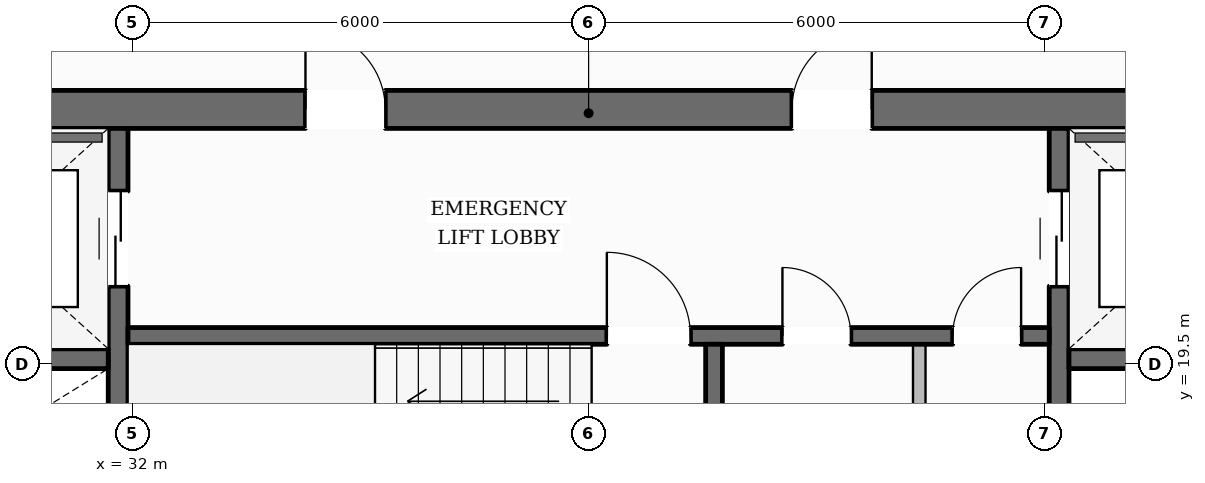
"""IFC4 building model, lengths in metres.
Left out: names, types, materials, properties, quantities, classifications, styles, units other than length and angle.
Written with IfcOpenShell. Run it as: python <this file> out.ifc"""

import sys

from ifc_helpers import new_model, si_unit, direction, frame, frame_2d, origin, place, context, subcontext, project, spatial, rectangle, extrude, element, fill, save


model = new_model("IFC4")
c1 = context("Model", 3, precision=1e-05, world=origin(), true_north=direction((0.0, 1.0)))
c2 = subcontext(c1, "Body", "Model", "MODEL_VIEW")
j1 = project(units=[si_unit("LENGTHUNIT", "METRE"), si_unit("PLANEANGLEUNIT", "RADIAN")], contexts=[c1])
p1 = place(None, origin())
s1 = spatial("IfcSite", under=j1, at=p1, CompositionType="ELEMENT")
p2 = place(p1, origin())
s2 = spatial("IfcBuilding", under=s1, at=p2, CompositionType="ELEMENT")
p3 = place(p2, frame((0.0, 0.0, 97.05)))
s3 = spatial("IfcBuildingStorey", under=s2, at=p3, CompositionType="ELEMENT", Elevation=97.05)
p4 = place(p3, frame((27.98, 22.85, 0.0), z_axis=(0.0, 0.0, 1.0), x_axis=(1.0, 0.0, 0.0)))
e1 = element("IfcWall", 1, at=p4, inside=s3, PredefinedType="SOLIDWALL", context=c2, shape_type="SweptSolid", body=[
    extrude(rectangle(XDim=20.04, YDim=0.5, at=frame_2d((10.02, 0.0))), origin(), (0.0, 0.0, 1.0), 3.6),
])
p5 = place(p4, frame((6.295, 0.0, 0.0)))
e2 = element("IfcOpeningElement", 2, at=p5, cuts=e1, PredefinedType="OPENING", context=c2, shape_type="SweptSolid", body=[
    extrude(rectangle(XDim=1.05, YDim=2.15, at=frame_2d((0.525, 1.075))), frame((0.0, 0.26, 0.0), z_axis=(0.0, -1.0, 0.0), x_axis=(1.0, 0.0, 0.0)), (0.0, 0.0, 1.0), 0.52),
])
p6 = place(p4, frame((12.695, 0.0, 0.0)))
e3 = element("IfcOpeningElement", 3, at=p6, cuts=e1, PredefinedType="OPENING", context=c2, shape_type="SweptSolid", body=[
    extrude(rectangle(XDim=1.05, YDim=2.15, at=frame_2d((0.525, 1.075))), frame((0.0, 0.26, 0.0), z_axis=(0.0, -1.0, 0.0), x_axis=(1.0, 0.0, 0.0)), (0.0, 0.0, 1.0), 0.52),
])
p7 = place(p3, frame((31.81, 9.6, 0.0), z_axis=(0.0, 0.0, 1.0), x_axis=(0.0, 1.0, 0.0)))
e4 = element("IfcWall", 4, at=p7, inside=s3, PredefinedType="SHEAR", context=c2, shape_type="SweptSolid", body=[
    extrude(rectangle(XDim=13.0, YDim=0.26, at=frame_2d((6.5, 0.0))), origin(), (0.0, 0.0, 1.0), 3.6),
])
p8 = place(p7, frame((10.925, 0.0, 0.0)))
e5 = element("IfcOpeningElement", 5, at=p8, cuts=e4, PredefinedType="OPENING", context=c2, shape_type="SweptSolid", body=[
    extrude(rectangle(XDim=1.25, YDim=2.25, at=frame_2d((0.625, 1.125))), frame((0.0, 0.14, 0.0), z_axis=(0.0, -1.0, 0.0), x_axis=(1.0, 0.0, 0.0)), (0.0, 0.0, 1.0), 0.28),
])
p9 = place(p3, frame((44.19, 9.6, 0.0), z_axis=(0.0, 0.0, 1.0), x_axis=(0.0, 1.0, 0.0)))
e6 = element("IfcWall", 6, at=p9, inside=s3, PredefinedType="SHEAR", context=c2, shape_type="SweptSolid", body=[
    extrude(rectangle(XDim=13.0, YDim=0.26, at=frame_2d((6.5, 0.0))), origin(), (0.0, 0.0, 1.0), 3.6),
])
p10 = place(p9, frame((10.925, 0.0, 0.0)))
e7 = element("IfcOpeningElement", 7, at=p10, cuts=e6, PredefinedType="OPENING", context=c2, shape_type="SweptSolid", body=[
    extrude(rectangle(XDim=1.25, YDim=2.25, at=frame_2d((0.625, 1.125))), frame((0.0, 0.14, 0.0), z_axis=(0.0, -1.0, 0.0), x_axis=(1.0, 0.0, 0.0)), (0.0, 0.0, 1.0), 0.28),
])
for number, where, z_axis, x_axis in (
    (8, (28.48, 19.57, 0.0), (0.0, 0.0, 1.0), (1.0, 0.0, 0.0)),
    (9, (44.32, 19.57, 0.0), (0.0, 0.0, 1.0), (1.0, 0.0, 0.0)),
):
    element("IfcWall", number, at=place(p3, frame(where, z_axis=z_axis, x_axis=x_axis)), inside=s3, PredefinedType="SHEAR", context=c2, shape_type="SweptSolid", body=[
        extrude(rectangle(XDim=3.2, YDim=0.26, at=frame_2d((1.6, 0.0))), origin(), (0.0, 0.0, 1.0), 3.6),
    ])
p11 = place(p3, frame((31.94, 19.87, 0.0), z_axis=(0.0, 0.0, 1.0), x_axis=(1.0, 0.0, 0.0)))
e10 = element("IfcWall", 10, at=p11, inside=s3, PredefinedType="SOLIDWALL", context=c2, shape_type="SweptSolid", body=[
    extrude(rectangle(XDim=12.12, YDim=0.22, at=frame_2d((6.06, 0.0))), origin(), (0.0, 0.0, 1.0), 3.6),
])
p12 = place(p11, frame((6.3, 0.0, 0.0)))
e11 = element("IfcOpeningElement", 11, at=p12, cuts=e10, PredefinedType="OPENING", context=c2, shape_type="SweptSolid", body=[
    extrude(rectangle(XDim=1.1, YDim=2.15, at=frame_2d((0.55, 1.075))), frame((0.0, 0.12, 0.0), z_axis=(0.0, -1.0, 0.0), x_axis=(1.0, 0.0, 0.0)), (0.0, 0.0, 1.0), 0.24),
])
p13 = place(p11, frame((8.61, 0.0, 0.0)))
e12 = element("IfcOpeningElement", 12, at=p13, cuts=e10, PredefinedType="OPENING", context=c2, shape_type="SweptSolid", body=[
    extrude(rectangle(XDim=0.9, YDim=2.1, at=frame_2d((0.45, 1.05))), frame((0.0, 0.12, 0.0), z_axis=(0.0, -1.0, 0.0), x_axis=(1.0, 0.0, 0.0)), (0.0, 0.0, 1.0), 0.24),
])
p14 = place(p11, frame((10.85, 0.0, 0.0)))
e13 = element("IfcOpeningElement", 13, at=p14, cuts=e10, PredefinedType="OPENING", context=c2, shape_type="SweptSolid", body=[
    extrude(rectangle(XDim=0.9, YDim=2.1, at=frame_2d((0.45, 1.05))), frame((0.0, 0.12, 0.0), z_axis=(0.0, -1.0, 0.0), x_axis=(1.0, 0.0, 0.0)), (0.0, 0.0, 1.0), 0.24),
])
p15 = place(p3, frame((39.65, 16.56, 0.0), z_axis=(0.0, 0.0, 1.0), x_axis=(0.0, 1.0, 0.0)))
e14 = element("IfcWall", 14, at=p15, inside=s3, PredefinedType="SOLIDWALL", context=c2, shape_type="SweptSolid", body=[
    extrude(rectangle(XDim=3.2, YDim=0.22, at=frame_2d((1.6, 0.0))), origin(), (0.0, 0.0, 1.0), 3.6),
])
p16 = place(p3, frame((14.113, 13.436, 0.0), z_axis=(0.0, 0.0, 1.0), x_axis=(0.493785476093, 0.869583753068, 0.0)))
e15 = element("IfcWall", 15, at=p16, inside=s3, PredefinedType="STANDARD", context=c2, shape_type="SweptSolid", body=[
    extrude(rectangle(XDim=36.023, YDim=0.38, at=frame_2d((18.011, 0.0))), origin(), (0.0, 0.0, 1.0), 3.059),
])
p17 = place(p16, frame((26.417, 0.0, 0.0)))
e16 = element("IfcOpeningElement", 16, at=p17, cuts=e15, PredefinedType="OPENING", context=c2, shape_type="SweptSolid", body=[
    extrude(rectangle(XDim=1.0, YDim=2.2, at=frame_2d((0.5, 1.1))), frame((0.0, 0.2, 0.0), z_axis=(0.0, -1.0, 0.0), x_axis=(1.0, 0.0, 0.0)), (0.0, 0.0, 1.0), 0.4),
])
p18 = place(p16, frame((31.845, 0.0, 0.65)))
e17 = element("IfcOpeningElement", 17, at=p18, cuts=e15, PredefinedType="OPENING", context=c2, shape_type="SweptSolid", body=[
    extrude(rectangle(XDim=1.55, YDim=1.75, at=frame_2d((0.775, 0.875))), frame((0.0, 0.2, 0.0), z_axis=(0.0, -1.0, 0.0), x_axis=(1.0, 0.0, 0.0)), (0.0, 0.0, 1.0), 0.4),
])
p19 = place(p16, frame((20.156, 0.0, 0.65)))
e18 = element("IfcOpeningElement", 18, at=p19, cuts=e15, PredefinedType="OPENING", context=c2, shape_type="SweptSolid", body=[
    extrude(rectangle(XDim=1.55, YDim=1.75, at=frame_2d((0.775, 0.875))), frame((0.0, 0.2, 0.0), z_axis=(0.0, -1.0, 0.0), x_axis=(1.0, 0.0, 0.0)), (0.0, 0.0, 1.0), 0.4),
])
p20 = place(p16, frame((8.466, 0.0, 0.65)))
e19 = element("IfcOpeningElement", 19, at=p20, cuts=e15, PredefinedType="OPENING", context=c2, shape_type="SweptSolid", body=[
    extrude(rectangle(XDim=1.55, YDim=1.75, at=frame_2d((0.775, 0.875))), frame((0.0, 0.2, 0.0), z_axis=(0.0, -1.0, 0.0), x_axis=(1.0, 0.0, 0.0)), (0.0, 0.0, 1.0), 0.4),
])
p21 = place(p16, frame((2.621, 0.0, 0.65)))
e20 = element("IfcOpeningElement", 20, at=p21, cuts=e15, PredefinedType="OPENING", context=c2, shape_type="SweptSolid", body=[
    extrude(rectangle(XDim=1.55, YDim=1.75, at=frame_2d((0.775, 0.875))), frame((0.0, 0.2, 0.0), z_axis=(0.0, -1.0, 0.0), x_axis=(1.0, 0.0, 0.0)), (0.0, 0.0, 1.0), 0.4),
])
p22 = place(p3, frame((44.161, 44.724, 0.0), z_axis=(0.0, 0.0, 1.0), x_axis=(0.496205042728, -0.86820536486, 0.0)))
e21 = element("IfcWall", 21, at=p22, inside=s3, PredefinedType="STANDARD", context=c2, shape_type="SweptSolid", body=[
    extrude(rectangle(XDim=36.193, YDim=0.38, at=frame_2d((18.097, 0.0))), origin(), (0.0, 0.0, 1.0), 3.059),
])
p23 = place(p22, frame((32.008, 0.0, 0.65)))
e22 = element("IfcOpeningElement", 22, at=p23, cuts=e21, PredefinedType="OPENING", context=c2, shape_type="SweptSolid", body=[
    extrude(rectangle(XDim=1.55, YDim=1.75, at=frame_2d((0.775, 0.875))), frame((0.0, 0.2, 0.0), z_axis=(0.0, -1.0, 0.0), x_axis=(1.0, 0.0, 0.0)), (0.0, 0.0, 1.0), 0.4),
])
p24 = place(p22, frame((26.134, 0.0, 0.65)))
e23 = element("IfcOpeningElement", 23, at=p24, cuts=e21, PredefinedType="OPENING", context=c2, shape_type="SweptSolid", body=[
    extrude(rectangle(XDim=1.55, YDim=1.75, at=frame_2d((0.775, 0.875))), frame((0.0, 0.2, 0.0), z_axis=(0.0, -1.0, 0.0), x_axis=(1.0, 0.0, 0.0)), (0.0, 0.0, 1.0), 0.4),
])
p25 = place(p22, frame((20.26, 0.0, 0.65)))
e24 = element("IfcOpeningElement", 24, at=p25, cuts=e21, PredefinedType="OPENING", context=c2, shape_type="SweptSolid", body=[
    extrude(rectangle(XDim=1.55, YDim=1.75, at=frame_2d((0.775, 0.875))), frame((0.0, 0.2, 0.0), z_axis=(0.0, -1.0, 0.0), x_axis=(1.0, 0.0, 0.0)), (0.0, 0.0, 1.0), 0.4),
])
p26 = place(p22, frame((8.513, 0.0, 0.65)))
e25 = element("IfcOpeningElement", 25, at=p26, cuts=e21, PredefinedType="OPENING", context=c2, shape_type="SweptSolid", body=[
    extrude(rectangle(XDim=1.55, YDim=1.75, at=frame_2d((0.775, 0.875))), frame((0.0, 0.2, 0.0), z_axis=(0.0, -1.0, 0.0), x_axis=(1.0, 0.0, 0.0)), (0.0, 0.0, 1.0), 0.4),
])
p27 = place(p22, frame((2.639, 0.0, 0.65)))
e26 = element("IfcOpeningElement", 26, at=p27, cuts=e21, PredefinedType="OPENING", context=c2, shape_type="SweptSolid", body=[
    extrude(rectangle(XDim=1.55, YDim=1.75, at=frame_2d((0.775, 0.875))), frame((0.0, 0.2, 0.0), z_axis=(0.0, -1.0, 0.0), x_axis=(1.0, 0.0, 0.0)), (0.0, 0.0, 1.0), 0.4),
])
p28 = place(p3, frame((42.35, 16.56, 0.0), z_axis=(0.0, 0.0, 1.0), x_axis=(0.0, 1.0, 0.0)))
e27 = element("IfcWall", 27, at=p28, inside=s3, PredefinedType="PARTITIONING", context=c2, shape_type="SweptSolid", body=[
    extrude(rectangle(XDim=3.2, YDim=0.165, at=frame_2d((1.6, 0.0))), origin(), (0.0, 0.0, 1.0), 3.6),
])
p29 = place(p3, frame((55.191, 23.522, 0.0), z_axis=(0.0, 0.0, 1.0), x_axis=(-0.774294364682, 0.632825597476, 0.0)))
e28 = element("IfcWall", 28, at=p29, inside=s3, PredefinedType="PARTITIONING", context=c2, shape_type="SweptSolid", body=[
    extrude(rectangle(XDim=13.905, YDim=0.125, at=frame_2d((6.952, 0.0))), origin(), (0.0, 0.0, 1.0), 3.288),
])
p30 = place(p29, frame((6.47, 0.0, 0.0)))
e29 = element("IfcOpeningElement", 29, at=p30, cuts=e28, PredefinedType="OPENING", context=c2, shape_type="SweptSolid", body=[
    extrude(rectangle(XDim=0.98, YDim=2.15, at=frame_2d((0.49, 1.075))), frame((0.0, 0.073, 0.0), z_axis=(0.0, -1.0, 0.0), x_axis=(1.0, 0.0, 0.0)), (0.0, 0.0, 1.0), 0.145),
])
p31 = place(p12, origin())
e30 = element("IfcDoor", 30, at=p31, inside=s3, OperationType="SINGLE_SWING_LEFT", PredefinedType="DOOR", context=c2, shape_type="SweptSolid", body=[
    extrude(rectangle(XDim=1.1, YDim=2.15, at=frame_2d((0.55, 1.075))), frame((0.0, 0.025, 0.0), z_axis=(0.0, -1.0, 0.0), x_axis=(1.0, 0.0, 0.0)), (0.0, 0.0, 1.0), 0.05),
])
fill(e11, e30)
p32 = place(p5, origin())
e31 = element("IfcDoor", 31, at=p32, inside=s3, OperationType="SINGLE_SWING_LEFT", PredefinedType="DOOR", context=c2, shape_type="SweptSolid", body=[
    extrude(rectangle(XDim=1.05, YDim=2.15, at=frame_2d((0.525, 1.075))), frame((0.0, 0.025, 0.0), z_axis=(0.0, -1.0, 0.0), x_axis=(1.0, 0.0, 0.0)), (0.0, 0.0, 1.0), 0.05),
])
fill(e2, e31)
p33 = place(p6, origin())
e32 = element("IfcDoor", 32, at=p33, inside=s3, OperationType="SINGLE_SWING_RIGHT", PredefinedType="DOOR", context=c2, shape_type="SweptSolid", body=[
    extrude(rectangle(XDim=1.05, YDim=2.15, at=frame_2d((0.525, 1.075))), frame((0.0, 0.025, 0.0), z_axis=(0.0, -1.0, 0.0), x_axis=(1.0, 0.0, 0.0)), (0.0, 0.0, 1.0), 0.05),
])
fill(e3, e32)
p34 = place(p8, origin())
e33 = element("IfcDoor", 33, at=p34, inside=s3, OperationType="DOUBLE_DOOR_SLIDING", PredefinedType="DOOR", context=c2, shape_type="SweptSolid", body=[
    extrude(rectangle(XDim=1.25, YDim=2.25, at=frame_2d((0.625, 1.125))), frame((0.0, 0.025, 0.0), z_axis=(0.0, -1.0, 0.0), x_axis=(1.0, 0.0, 0.0)), (0.0, 0.0, 1.0), 0.05),
])
fill(e5, e33)
p35 = place(p10, origin())
e34 = element("IfcDoor", 34, at=p35, inside=s3, OperationType="DOUBLE_DOOR_SLIDING", PredefinedType="DOOR", context=c2, shape_type="SweptSolid", body=[
    extrude(rectangle(XDim=1.25, YDim=2.25, at=frame_2d((0.625, 1.125))), frame((0.0, 0.025, 0.0), z_axis=(0.0, -1.0, 0.0), x_axis=(1.0, 0.0, 0.0)), (0.0, 0.0, 1.0), 0.05),
])
fill(e7, e34)
p36 = place(p13, origin())
e35 = element("IfcDoor", 35, at=p36, inside=s3, OperationType="SINGLE_SWING_LEFT", PredefinedType="DOOR", context=c2, shape_type="SweptSolid", body=[
    extrude(rectangle(XDim=0.9, YDim=2.1, at=frame_2d((0.45, 1.05))), frame((0.0, 0.025, 0.0), z_axis=(0.0, -1.0, 0.0), x_axis=(1.0, 0.0, 0.0)), (0.0, 0.0, 1.0), 0.05),
])
fill(e12, e35)
p37 = place(p14, origin())
e36 = element("IfcDoor", 36, at=p37, inside=s3, OperationType="SINGLE_SWING_RIGHT", PredefinedType="DOOR", context=c2, shape_type="SweptSolid", body=[
    extrude(rectangle(XDim=0.9, YDim=2.1, at=frame_2d((0.45, 1.05))), frame((0.0, 0.025, 0.0), z_axis=(0.0, -1.0, 0.0), x_axis=(1.0, 0.0, 0.0)), (0.0, 0.0, 1.0), 0.05),
])
fill(e13, e36)
save(model, sys.argv[1])
